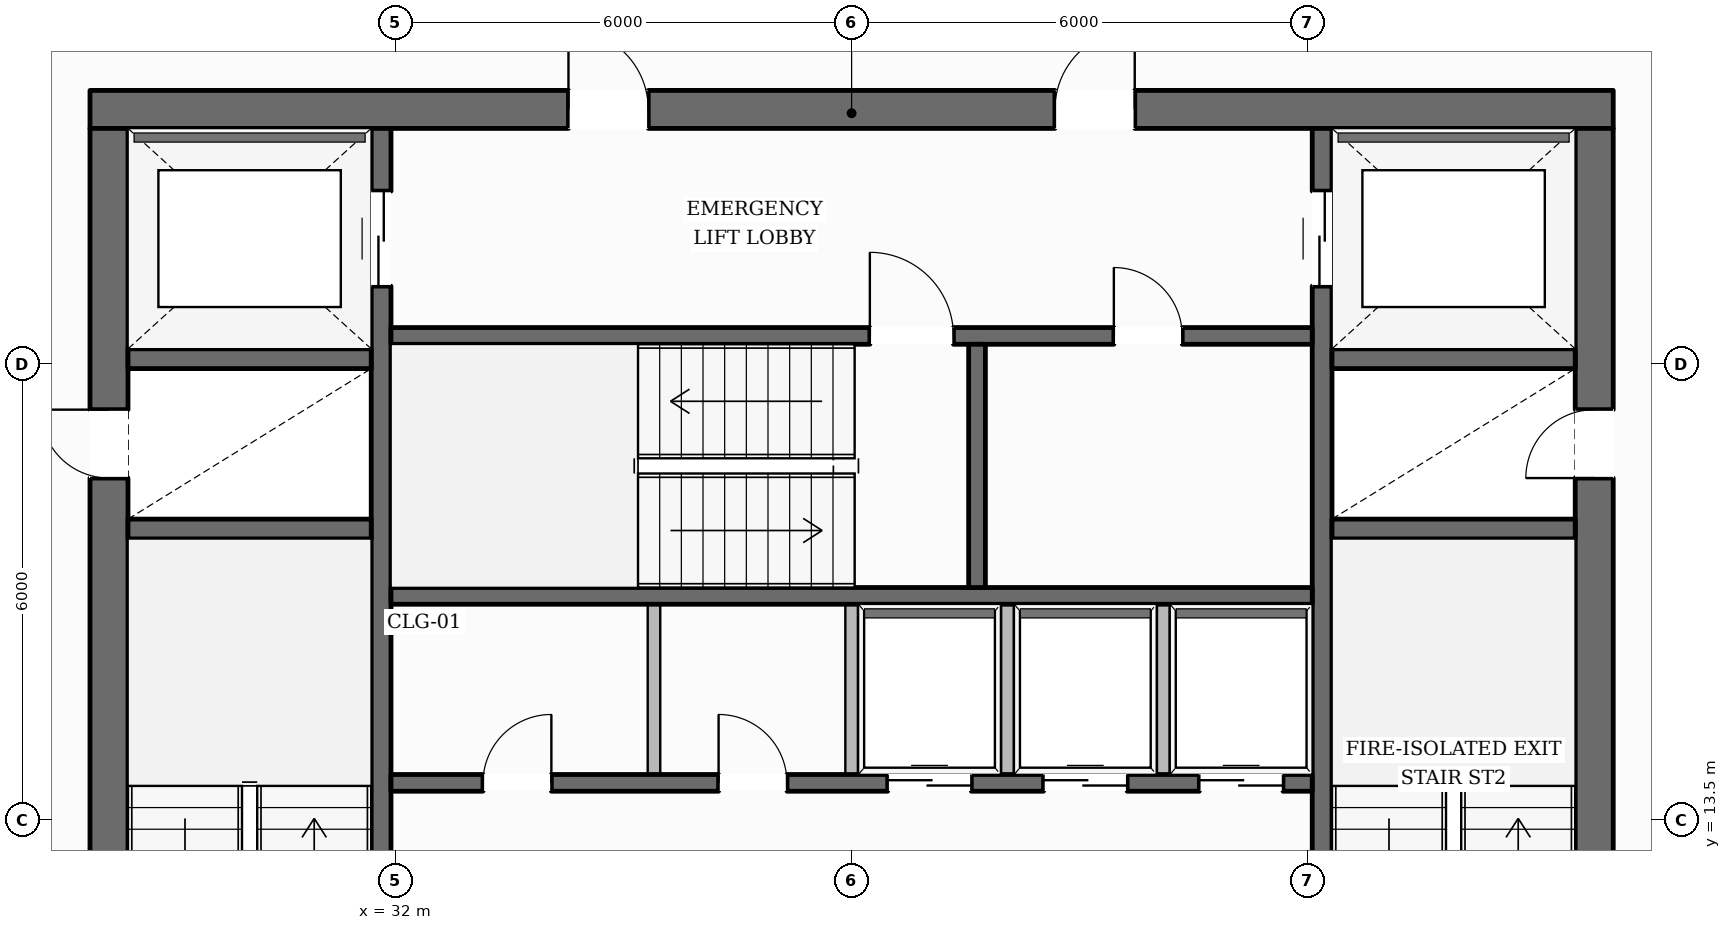
"""IFC4 building model, lengths in metres.
Left out: names, types, materials, properties, quantities, classifications, styles, units other than length and angle.
Written with IfcOpenShell. Run it as: python <this file> out.ifc"""

import sys

from ifc_helpers import new_model, si_unit, direction, frame, frame_2d, origin, place, context, subcontext, project, spatial, rectangle, extrude, element, fill, save


model = new_model("IFC4")
c1 = context("Model", 3, precision=1e-05, world=origin(), true_north=direction((0.0, 1.0)))
c2 = subcontext(c1, "Body", "Model", "MODEL_VIEW")
j1 = project(units=[si_unit("LENGTHUNIT", "METRE"), si_unit("PLANEANGLEUNIT", "RADIAN")], contexts=[c1])
p1 = place(None, origin())
s1 = spatial("IfcSite", under=j1, at=p1, CompositionType="ELEMENT")
p2 = place(p1, origin())
s2 = spatial("IfcBuilding", under=s1, at=p2, CompositionType="ELEMENT")
p3 = place(p2, frame((0.0, 0.0, 124.0)))
s3 = spatial("IfcBuildingStorey", under=s2, at=p3, CompositionType="ELEMENT", Elevation=124.0)
p4 = place(p3, frame((27.98, 22.85, 0.0), z_axis=(0.0, 0.0, 1.0), x_axis=(1.0, 0.0, 0.0)))
e1 = element("IfcWall", 1, at=p4, inside=s3, PredefinedType="SOLIDWALL", context=c2, shape_type="SweptSolid", body=[
    extrude(rectangle(XDim=20.04, YDim=0.5, at=frame_2d((10.02, 0.0))), origin(), (0.0, 0.0, 1.0), 3.6),
])
p5 = place(p4, frame((6.295, 0.0, 0.0)))
e2 = element("IfcOpeningElement", 2, at=p5, cuts=e1, PredefinedType="OPENING", context=c2, shape_type="SweptSolid", body=[
    extrude(rectangle(XDim=1.05, YDim=2.15, at=frame_2d((0.525, 1.075))), frame((0.0, 0.26, 0.0), z_axis=(0.0, -1.0, 0.0), x_axis=(1.0, 0.0, 0.0)), (0.0, 0.0, 1.0), 0.52),
])
p6 = place(p4, frame((12.695, 0.0, 0.0)))
e3 = element("IfcOpeningElement", 3, at=p6, cuts=e1, PredefinedType="OPENING", context=c2, shape_type="SweptSolid", body=[
    extrude(rectangle(XDim=1.05, YDim=2.15, at=frame_2d((0.525, 1.075))), frame((0.0, 0.26, 0.0), z_axis=(0.0, -1.0, 0.0), x_axis=(1.0, 0.0, 0.0)), (0.0, 0.0, 1.0), 0.52),
])
p7 = place(p3, frame((28.23, 9.6, 0.0), z_axis=(0.0, 0.0, 1.0), x_axis=(0.0, 1.0, 0.0)))
e4 = element("IfcWall", 4, at=p7, inside=s3, PredefinedType="SOLIDWALL", context=c2, shape_type="SweptSolid", body=[
    extrude(rectangle(XDim=13.0, YDim=0.5, at=frame_2d((6.5, 0.0))), origin(), (0.0, 0.0, 1.0), 3.6),
])
p8 = place(p7, frame((0.2, 0.0, 0.0)))
e5 = element("IfcOpeningElement", 5, at=p8, cuts=e4, PredefinedType="OPENING", context=c2, shape_type="SweptSolid", body=[
    extrude(rectangle(XDim=1.1, YDim=2.15, at=frame_2d((0.55, 1.075))), frame((0.0, 0.26, 0.0), z_axis=(0.0, -1.0, 0.0), x_axis=(1.0, 0.0, 0.0)), (0.0, 0.0, 1.0), 0.52),
])
p9 = place(p7, frame((8.4, 0.0, 0.0)))
e6 = element("IfcOpeningElement", 6, at=p9, cuts=e4, PredefinedType="OPENING", context=c2, shape_type="SweptSolid", body=[
    extrude(rectangle(XDim=0.9, YDim=2.1, at=frame_2d((0.45, 1.05))), frame((0.0, 0.26, 0.0), z_axis=(0.0, -1.0, 0.0), x_axis=(1.0, 0.0, 0.0)), (0.0, 0.0, 1.0), 0.52),
])
p10 = place(p3, frame((47.77, 9.6, 0.0), z_axis=(0.0, 0.0, 1.0), x_axis=(0.0, 1.0, 0.0)))
e7 = element("IfcWall", 7, at=p10, inside=s3, PredefinedType="SOLIDWALL", context=c2, shape_type="SweptSolid", body=[
    extrude(rectangle(XDim=13.0, YDim=0.5, at=frame_2d((6.5, 0.0))), origin(), (0.0, 0.0, 1.0), 3.6),
])
p11 = place(p10, frame((0.2, 0.0, 0.0)))
e8 = element("IfcOpeningElement", 8, at=p11, cuts=e7, PredefinedType="OPENING", context=c2, shape_type="SweptSolid", body=[
    extrude(rectangle(XDim=1.1, YDim=2.15, at=frame_2d((0.55, 1.075))), frame((0.0, 0.26, 0.0), z_axis=(0.0, -1.0, 0.0), x_axis=(1.0, 0.0, 0.0)), (0.0, 0.0, 1.0), 0.52),
])
p12 = place(p10, frame((8.4, 0.0, 0.0)))
e9 = element("IfcOpeningElement", 9, at=p12, cuts=e7, PredefinedType="OPENING", context=c2, shape_type="SweptSolid", body=[
    extrude(rectangle(XDim=0.9, YDim=2.1, at=frame_2d((0.45, 1.05))), frame((0.0, 0.26, 0.0), z_axis=(0.0, -1.0, 0.0), x_axis=(1.0, 0.0, 0.0)), (0.0, 0.0, 1.0), 0.52),
])
p13 = place(p3, frame((31.81, 9.6, 0.0), z_axis=(0.0, 0.0, 1.0), x_axis=(0.0, 1.0, 0.0)))
e10 = element("IfcWall", 10, at=p13, inside=s3, PredefinedType="SHEAR", context=c2, shape_type="SweptSolid", body=[
    extrude(rectangle(XDim=13.0, YDim=0.26, at=frame_2d((6.5, 0.0))), origin(), (0.0, 0.0, 1.0), 3.6),
])
p14 = place(p13, frame((10.925, 0.0, 0.0)))
e11 = element("IfcOpeningElement", 11, at=p14, cuts=e10, PredefinedType="OPENING", context=c2, shape_type="SweptSolid", body=[
    extrude(rectangle(XDim=1.25, YDim=2.25, at=frame_2d((0.625, 1.125))), frame((0.0, 0.14, 0.0), z_axis=(0.0, -1.0, 0.0), x_axis=(1.0, 0.0, 0.0)), (0.0, 0.0, 1.0), 0.28),
])
p15 = place(p3, frame((44.19, 9.6, 0.0), z_axis=(0.0, 0.0, 1.0), x_axis=(0.0, 1.0, 0.0)))
e12 = element("IfcWall", 12, at=p15, inside=s3, PredefinedType="SHEAR", context=c2, shape_type="SweptSolid", body=[
    extrude(rectangle(XDim=13.0, YDim=0.26, at=frame_2d((6.5, 0.0))), origin(), (0.0, 0.0, 1.0), 3.6),
])
p16 = place(p15, frame((10.925, 0.0, 0.0)))
e13 = element("IfcOpeningElement", 13, at=p16, cuts=e12, PredefinedType="OPENING", context=c2, shape_type="SweptSolid", body=[
    extrude(rectangle(XDim=1.25, YDim=2.25, at=frame_2d((0.625, 1.125))), frame((0.0, 0.14, 0.0), z_axis=(0.0, -1.0, 0.0), x_axis=(1.0, 0.0, 0.0)), (0.0, 0.0, 1.0), 0.28),
])
for number, where, z_axis, x_axis in (
    (14, (28.48, 17.33, 0.0), (0.0, 0.0, 1.0), (1.0, 0.0, 0.0)),
    (15, (28.48, 19.57, 0.0), (0.0, 0.0, 1.0), (1.0, 0.0, 0.0)),
    (16, (44.32, 17.33, 0.0), (0.0, 0.0, 1.0), (1.0, 0.0, 0.0)),
    (17, (44.32, 19.57, 0.0), (0.0, 0.0, 1.0), (1.0, 0.0, 0.0)),
):
    element("IfcWall", number, at=place(p3, frame(where, z_axis=z_axis, x_axis=x_axis)), inside=s3, PredefinedType="SHEAR", context=c2, shape_type="SweptSolid", body=[
        extrude(rectangle(XDim=3.2, YDim=0.26, at=frame_2d((1.6, 0.0))), origin(), (0.0, 0.0, 1.0), 3.6),
    ])
p17 = place(p3, frame((31.94, 19.87, 0.0), z_axis=(0.0, 0.0, 1.0), x_axis=(1.0, 0.0, 0.0)))
e18 = element("IfcWall", 18, at=p17, inside=s3, PredefinedType="SOLIDWALL", context=c2, shape_type="SweptSolid", body=[
    extrude(rectangle(XDim=12.12, YDim=0.22, at=frame_2d((6.06, 0.0))), origin(), (0.0, 0.0, 1.0), 3.6),
])
p18 = place(p17, frame((6.3, 0.0, 0.0)))
e19 = element("IfcOpeningElement", 19, at=p18, cuts=e18, PredefinedType="OPENING", context=c2, shape_type="SweptSolid", body=[
    extrude(rectangle(XDim=1.1, YDim=2.15, at=frame_2d((0.55, 1.075))), frame((0.0, 0.12, 0.0), z_axis=(0.0, -1.0, 0.0), x_axis=(1.0, 0.0, 0.0)), (0.0, 0.0, 1.0), 0.24),
])
p19 = place(p17, frame((9.51, 0.0, 0.0)))
e20 = element("IfcOpeningElement", 20, at=p19, cuts=e18, PredefinedType="OPENING", context=c2, shape_type="SweptSolid", body=[
    extrude(rectangle(XDim=0.9, YDim=2.1, at=frame_2d((0.45, 1.05))), frame((0.0, 0.12, 0.0), z_axis=(0.0, -1.0, 0.0), x_axis=(1.0, 0.0, 0.0)), (0.0, 0.0, 1.0), 0.24),
])
p20 = place(p3, frame((31.94, 16.45, 0.0), z_axis=(0.0, 0.0, 1.0), x_axis=(1.0, 0.0, 0.0)))
e21 = element("IfcWall", 21, at=p20, inside=s3, PredefinedType="SOLIDWALL", context=c2, shape_type="SweptSolid", body=[
    extrude(rectangle(XDim=12.12, YDim=0.22, at=frame_2d((6.06, 0.0))), origin(), (0.0, 0.0, 1.0), 3.6),
])
p21 = place(p3, frame((39.65, 16.56, 0.0), z_axis=(0.0, 0.0, 1.0), x_axis=(0.0, 1.0, 0.0)))
e22 = element("IfcWall", 22, at=p21, inside=s3, PredefinedType="SOLIDWALL", context=c2, shape_type="SweptSolid", body=[
    extrude(rectangle(XDim=3.2, YDim=0.22, at=frame_2d((1.6, 0.0))), origin(), (0.0, 0.0, 1.0), 3.6),
])
p22 = place(p3, frame((31.94, 13.99, 0.0), z_axis=(0.0, 0.0, 1.0), x_axis=(1.0, 0.0, 0.0)))
e23 = element("IfcWall", 23, at=p22, inside=s3, PredefinedType="SOLIDWALL", context=c2, shape_type="SweptSolid", body=[
    extrude(rectangle(XDim=12.12, YDim=0.22, at=frame_2d((6.06, 0.0))), origin(), (0.0, 0.0, 1.0), 3.6),
])
p23 = place(p22, frame((1.21, 0.0, 0.0)))
e24 = element("IfcOpeningElement", 24, at=p23, cuts=e23, PredefinedType="OPENING", context=c2, shape_type="SweptSolid", body=[
    extrude(rectangle(XDim=0.9, YDim=2.1, at=frame_2d((0.45, 1.05))), frame((0.0, 0.12, 0.0), z_axis=(0.0, -1.0, 0.0), x_axis=(1.0, 0.0, 0.0)), (0.0, 0.0, 1.0), 0.24),
])
p24 = place(p22, frame((4.31, 0.0, 0.0)))
e25 = element("IfcOpeningElement", 25, at=p24, cuts=e23, PredefinedType="OPENING", context=c2, shape_type="SweptSolid", body=[
    extrude(rectangle(XDim=0.9, YDim=2.1, at=frame_2d((0.45, 1.05))), frame((0.0, 0.12, 0.0), z_axis=(0.0, -1.0, 0.0), x_axis=(1.0, 0.0, 0.0)), (0.0, 0.0, 1.0), 0.24),
])
p25 = place(p22, frame((6.535, 0.0, 0.0)))
e26 = element("IfcOpeningElement", 26, at=p25, cuts=e23, PredefinedType="OPENING", context=c2, shape_type="SweptSolid", body=[
    extrude(rectangle(XDim=1.1, YDim=2.2, at=frame_2d((0.55, 1.1))), frame((0.0, 0.12, 0.0), z_axis=(0.0, -1.0, 0.0), x_axis=(1.0, 0.0, 0.0)), (0.0, 0.0, 1.0), 0.24),
])
p26 = place(p22, frame((8.585, 0.0, 0.0)))
e27 = element("IfcOpeningElement", 27, at=p26, cuts=e23, PredefinedType="OPENING", context=c2, shape_type="SweptSolid", body=[
    extrude(rectangle(XDim=1.1, YDim=2.2, at=frame_2d((0.55, 1.1))), frame((0.0, 0.12, 0.0), z_axis=(0.0, -1.0, 0.0), x_axis=(1.0, 0.0, 0.0)), (0.0, 0.0, 1.0), 0.24),
])
p27 = place(p22, frame((10.635, 0.0, 0.0)))
e28 = element("IfcOpeningElement", 28, at=p27, cuts=e23, PredefinedType="OPENING", context=c2, shape_type="SweptSolid", body=[
    extrude(rectangle(XDim=1.1, YDim=2.2, at=frame_2d((0.55, 1.1))), frame((0.0, 0.12, 0.0), z_axis=(0.0, -1.0, 0.0), x_axis=(1.0, 0.0, 0.0)), (0.0, 0.0, 1.0), 0.24),
])
p28 = place(p3, frame((13.815, 12.649, 0.0), z_axis=(0.0, 0.0, 1.0), x_axis=(0.501718288841, 0.865031073801, 0.0)))
e29 = element("IfcWall", 29, at=p28, inside=s3, PredefinedType="STANDARD", context=c2, shape_type="SweptSolid", body=[
    extrude(rectangle(XDim=36.708, YDim=0.38, at=frame_2d((18.354, 0.0))), origin(), (0.0, 0.0, 1.0), 3.059),
])
p29 = place(p28, frame((32.476, 0.0, 0.65)))
e30 = element("IfcOpeningElement", 30, at=p29, cuts=e29, PredefinedType="OPENING", context=c2, shape_type="SweptSolid", body=[
    extrude(rectangle(XDim=1.55, YDim=1.75, at=frame_2d((0.775, 0.875))), frame((0.0, 0.2, 0.0), z_axis=(0.0, -1.0, 0.0), x_axis=(1.0, 0.0, 0.0)), (0.0, 0.0, 1.0), 0.4),
])
p30 = place(p28, frame((26.517, 0.0, 0.65)))
e31 = element("IfcOpeningElement", 31, at=p30, cuts=e29, PredefinedType="OPENING", context=c2, shape_type="SweptSolid", body=[
    extrude(rectangle(XDim=1.55, YDim=1.75, at=frame_2d((0.775, 0.875))), frame((0.0, 0.2, 0.0), z_axis=(0.0, -1.0, 0.0), x_axis=(1.0, 0.0, 0.0)), (0.0, 0.0, 1.0), 0.4),
])
p31 = place(p28, frame((14.601, 0.0, 0.65)))
e32 = element("IfcOpeningElement", 32, at=p31, cuts=e29, PredefinedType="OPENING", context=c2, shape_type="SweptSolid", body=[
    extrude(rectangle(XDim=1.55, YDim=1.75, at=frame_2d((0.775, 0.875))), frame((0.0, 0.2, 0.0), z_axis=(0.0, -1.0, 0.0), x_axis=(1.0, 0.0, 0.0)), (0.0, 0.0, 1.0), 0.4),
])
p32 = place(p28, frame((8.643, 0.0, 0.65)))
e33 = element("IfcOpeningElement", 33, at=p32, cuts=e29, PredefinedType="OPENING", context=c2, shape_type="SweptSolid", body=[
    extrude(rectangle(XDim=1.55, YDim=1.75, at=frame_2d((0.775, 0.875))), frame((0.0, 0.2, 0.0), z_axis=(0.0, -1.0, 0.0), x_axis=(1.0, 0.0, 0.0)), (0.0, 0.0, 1.0), 0.4),
])
p33 = place(p28, frame((2.684, 0.0, 0.65)))
e34 = element("IfcOpeningElement", 34, at=p33, cuts=e29, PredefinedType="OPENING", context=c2, shape_type="SweptSolid", body=[
    extrude(rectangle(XDim=1.55, YDim=1.75, at=frame_2d((0.775, 0.875))), frame((0.0, 0.2, 0.0), z_axis=(0.0, -1.0, 0.0), x_axis=(1.0, 0.0, 0.0)), (0.0, 0.0, 1.0), 0.4),
])
p34 = place(p3, frame((43.881, 44.336, 0.0), z_axis=(0.0, 0.0, 1.0), x_axis=(0.506335448268, -0.862336601234, 0.0)))
e35 = element("IfcWall", 35, at=p34, inside=s3, PredefinedType="STANDARD", context=c2, shape_type="SweptSolid", body=[
    extrude(rectangle(XDim=37.05, YDim=0.38, at=frame_2d((18.525, 0.0))), origin(), (0.0, 0.0, 1.0), 3.059),
])
p35 = place(p34, frame((32.786, 0.0, 0.65)))
e36 = element("IfcOpeningElement", 36, at=p35, cuts=e35, PredefinedType="OPENING", context=c2, shape_type="SweptSolid", body=[
    extrude(rectangle(XDim=1.55, YDim=1.75, at=frame_2d((0.775, 0.875))), frame((0.0, 0.2, 0.0), z_axis=(0.0, -1.0, 0.0), x_axis=(1.0, 0.0, 0.0)), (0.0, 0.0, 1.0), 0.4),
])
p36 = place(p34, frame((26.77, 0.0, 0.65)))
e37 = element("IfcOpeningElement", 37, at=p36, cuts=e35, PredefinedType="OPENING", context=c2, shape_type="SweptSolid", body=[
    extrude(rectangle(XDim=1.55, YDim=1.75, at=frame_2d((0.775, 0.875))), frame((0.0, 0.2, 0.0), z_axis=(0.0, -1.0, 0.0), x_axis=(1.0, 0.0, 0.0)), (0.0, 0.0, 1.0), 0.4),
])
p37 = place(p34, frame((14.738, 0.0, 0.65)))
e38 = element("IfcOpeningElement", 38, at=p37, cuts=e35, PredefinedType="OPENING", context=c2, shape_type="SweptSolid", body=[
    extrude(rectangle(XDim=1.55, YDim=1.75, at=frame_2d((0.775, 0.875))), frame((0.0, 0.2, 0.0), z_axis=(0.0, -1.0, 0.0), x_axis=(1.0, 0.0, 0.0)), (0.0, 0.0, 1.0), 0.4),
])
p38 = place(p34, frame((8.722, 0.0, 0.65)))
e39 = element("IfcOpeningElement", 39, at=p38, cuts=e35, PredefinedType="OPENING", context=c2, shape_type="SweptSolid", body=[
    extrude(rectangle(XDim=1.55, YDim=1.75, at=frame_2d((0.775, 0.875))), frame((0.0, 0.2, 0.0), z_axis=(0.0, -1.0, 0.0), x_axis=(1.0, 0.0, 0.0)), (0.0, 0.0, 1.0), 0.4),
])
p39 = place(p34, frame((2.706, 0.0, 0.65)))
e40 = element("IfcOpeningElement", 40, at=p39, cuts=e35, PredefinedType="OPENING", context=c2, shape_type="SweptSolid", body=[
    extrude(rectangle(XDim=1.55, YDim=1.75, at=frame_2d((0.775, 0.875))), frame((0.0, 0.2, 0.0), z_axis=(0.0, -1.0, 0.0), x_axis=(1.0, 0.0, 0.0)), (0.0, 0.0, 1.0), 0.4),
])
for number, where, z_axis, x_axis in (
    (41, (38.0, 14.1, 0.0), (0.0, 0.0, 1.0), (0.0, 1.0, 0.0)),
    (42, (35.4, 14.1, 0.0), (0.0, 0.0, 1.0), (0.0, 1.0, 0.0)),
    (43, (40.05, 14.1, 0.0), (0.0, 0.0, 1.0), (0.0, 1.0, 0.0)),
    (44, (42.1, 14.1, 0.0), (0.0, 0.0, 1.0), (0.0, 1.0, 0.0)),
):
    element("IfcWall", number, at=place(p3, frame(where, z_axis=z_axis, x_axis=x_axis)), inside=s3, PredefinedType="PARTITIONING", context=c2, shape_type="SweptSolid", body=[
        extrude(rectangle(XDim=2.24, YDim=0.165, at=frame_2d((1.12, 0.0))), origin(), (0.0, 0.0, 1.0), 3.6),
    ])
p40 = place(p18, origin())
e45 = element("IfcDoor", 45, at=p40, inside=s3, OperationType="SINGLE_SWING_LEFT", PredefinedType="DOOR", context=c2, shape_type="SweptSolid", body=[
    extrude(rectangle(XDim=1.1, YDim=2.15, at=frame_2d((0.55, 1.075))), frame((0.0, 0.025, 0.0), z_axis=(0.0, -1.0, 0.0), x_axis=(1.0, 0.0, 0.0)), (0.0, 0.0, 1.0), 0.05),
])
fill(e19, e45)
p41 = place(p9, origin())
e46 = element("IfcDoor", 46, at=p41, inside=s3, OperationType="SINGLE_SWING_RIGHT", PredefinedType="DOOR", context=c2, shape_type="SweptSolid", body=[
    extrude(rectangle(XDim=0.9, YDim=2.1, at=frame_2d((0.45, 1.05))), frame((0.0, 0.025, 0.0), z_axis=(0.0, -1.0, 0.0), x_axis=(1.0, 0.0, 0.0)), (0.0, 0.0, 1.0), 0.05),
])
fill(e6, e46)
p42 = place(p12, origin())
e47 = element("IfcDoor", 47, at=p42, inside=s3, OperationType="SINGLE_SWING_LEFT", PredefinedType="DOOR", context=c2, shape_type="SweptSolid", body=[
    extrude(rectangle(XDim=0.9, YDim=2.1, at=frame_2d((0.45, 1.05))), frame((0.0, 0.025, 0.0), z_axis=(0.0, -1.0, 0.0), x_axis=(1.0, 0.0, 0.0)), (0.0, 0.0, 1.0), 0.05),
])
fill(e9, e47)
p43 = place(p5, origin())
e48 = element("IfcDoor", 48, at=p43, inside=s3, OperationType="SINGLE_SWING_LEFT", PredefinedType="DOOR", context=c2, shape_type="SweptSolid", body=[
    extrude(rectangle(XDim=1.05, YDim=2.15, at=frame_2d((0.525, 1.075))), frame((0.0, 0.025, 0.0), z_axis=(0.0, -1.0, 0.0), x_axis=(1.0, 0.0, 0.0)), (0.0, 0.0, 1.0), 0.05),
])
fill(e2, e48)
p44 = place(p6, origin())
e49 = element("IfcDoor", 49, at=p44, inside=s3, OperationType="SINGLE_SWING_RIGHT", PredefinedType="DOOR", context=c2, shape_type="SweptSolid", body=[
    extrude(rectangle(XDim=1.05, YDim=2.15, at=frame_2d((0.525, 1.075))), frame((0.0, 0.025, 0.0), z_axis=(0.0, -1.0, 0.0), x_axis=(1.0, 0.0, 0.0)), (0.0, 0.0, 1.0), 0.05),
])
fill(e3, e49)
p45 = place(p14, origin())
e50 = element("IfcDoor", 50, at=p45, inside=s3, OperationType="DOUBLE_DOOR_SLIDING", PredefinedType="DOOR", context=c2, shape_type="SweptSolid", body=[
    extrude(rectangle(XDim=1.25, YDim=2.25, at=frame_2d((0.625, 1.125))), frame((0.0, 0.025, 0.0), z_axis=(0.0, -1.0, 0.0), x_axis=(1.0, 0.0, 0.0)), (0.0, 0.0, 1.0), 0.05),
])
fill(e11, e50)
p46 = place(p16, origin())
e51 = element("IfcDoor", 51, at=p46, inside=s3, OperationType="DOUBLE_DOOR_SLIDING", PredefinedType="DOOR", context=c2, shape_type="SweptSolid", body=[
    extrude(rectangle(XDim=1.25, YDim=2.25, at=frame_2d((0.625, 1.125))), frame((0.0, 0.025, 0.0), z_axis=(0.0, -1.0, 0.0), x_axis=(1.0, 0.0, 0.0)), (0.0, 0.0, 1.0), 0.05),
])
fill(e13, e51)
p47 = place(p23, origin())
e52 = element("IfcDoor", 52, at=p47, inside=s3, OperationType="SINGLE_SWING_RIGHT", PredefinedType="DOOR", context=c2, shape_type="SweptSolid", body=[
    extrude(rectangle(XDim=0.9, YDim=2.1, at=frame_2d((0.45, 1.05))), frame((0.0, 0.025, 0.0), z_axis=(0.0, -1.0, 0.0), x_axis=(1.0, 0.0, 0.0)), (0.0, 0.0, 1.0), 0.05),
])
fill(e24, e52)
p48 = place(p24, origin())
e53 = element("IfcDoor", 53, at=p48, inside=s3, OperationType="SINGLE_SWING_LEFT", PredefinedType="DOOR", context=c2, shape_type="SweptSolid", body=[
    extrude(rectangle(XDim=0.9, YDim=2.1, at=frame_2d((0.45, 1.05))), frame((0.0, 0.025, 0.0), z_axis=(0.0, -1.0, 0.0), x_axis=(1.0, 0.0, 0.0)), (0.0, 0.0, 1.0), 0.05),
])
fill(e25, e53)
p49 = place(p25, origin())
e54 = element("IfcDoor", 54, at=p49, inside=s3, OperationType="DOUBLE_DOOR_SLIDING", PredefinedType="DOOR", context=c2, shape_type="SweptSolid", body=[
    extrude(rectangle(XDim=1.1, YDim=2.2, at=frame_2d((0.55, 1.1))), frame((0.0, 0.025, 0.0), z_axis=(0.0, -1.0, 0.0), x_axis=(1.0, 0.0, 0.0)), (0.0, 0.0, 1.0), 0.05),
])
fill(e26, e54)
p50 = place(p26, origin())
e55 = element("IfcDoor", 55, at=p50, inside=s3, OperationType="DOUBLE_DOOR_SLIDING", PredefinedType="DOOR", context=c2, shape_type="SweptSolid", body=[
    extrude(rectangle(XDim=1.1, YDim=2.2, at=frame_2d((0.55, 1.1))), frame((0.0, 0.025, 0.0), z_axis=(0.0, -1.0, 0.0), x_axis=(1.0, 0.0, 0.0)), (0.0, 0.0, 1.0), 0.05),
])
fill(e27, e55)
p51 = place(p27, origin())
e56 = element("IfcDoor", 56, at=p51, inside=s3, OperationType="DOUBLE_DOOR_SLIDING", PredefinedType="DOOR", context=c2, shape_type="SweptSolid", body=[
    extrude(rectangle(XDim=1.1, YDim=2.2, at=frame_2d((0.55, 1.1))), frame((0.0, 0.025, 0.0), z_axis=(0.0, -1.0, 0.0), x_axis=(1.0, 0.0, 0.0)), (0.0, 0.0, 1.0), 0.05),
])
fill(e28, e56)
p52 = place(p19, origin())
e57 = element("IfcDoor", 57, at=p52, inside=s3, OperationType="SINGLE_SWING_LEFT", PredefinedType="DOOR", context=c2, shape_type="SweptSolid", body=[
    extrude(rectangle(XDim=0.9, YDim=2.1, at=frame_2d((0.45, 1.05))), frame((0.0, 0.025, 0.0), z_axis=(0.0, -1.0, 0.0), x_axis=(1.0, 0.0, 0.0)), (0.0, 0.0, 1.0), 0.05),
])
fill(e20, e57)
save(model, sys.argv[1])
